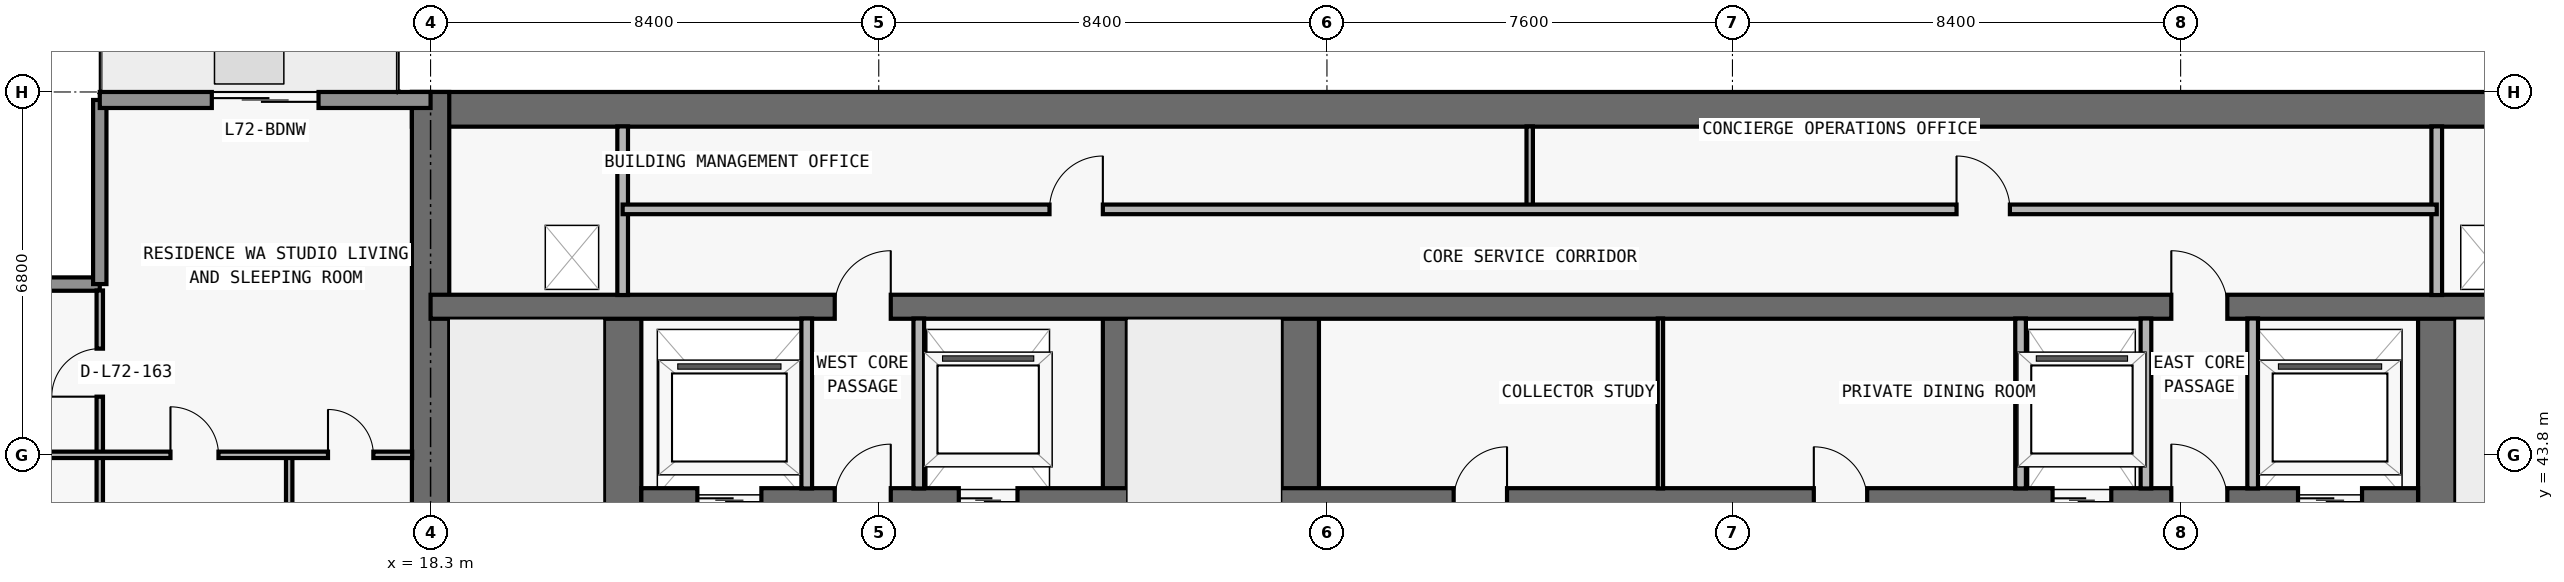
"""IFC4 building model, lengths in metres.
Left out: names, types, materials, properties, quantities, classifications, styles, units other than length and angle.
Written with IfcOpenShell. Run it as: python <this file> out.ifc"""

import sys

from ifc_helpers import new_model, si_unit, direction, frame, frame_2d, origin, place, context, subcontext, project, spatial, rectangle, extrude, element, fill, save


model = new_model("IFC4")
c1 = context("Model", 3, precision=1e-05, world=origin(), true_north=direction((0.0, 1.0)))
c2 = subcontext(c1, "Body", "Model", "MODEL_VIEW")
j1 = project(units=[si_unit("LENGTHUNIT", "METRE"), si_unit("PLANEANGLEUNIT", "RADIAN")], contexts=[c1])
p1 = place(None, origin())
s1 = spatial("IfcSite", under=j1, at=p1, CompositionType="ELEMENT")
p2 = place(p1, origin())
s2 = spatial("IfcBuilding", under=s1, at=p2, CompositionType="ELEMENT")
p3 = place(p2, frame((0.0, 0.0, 256.2)))
s3 = spatial("IfcBuildingStorey", under=s2, at=p3, CompositionType="ELEMENT", Elevation=256.2)
p4 = place(p3, frame((17.95, 50.275, 0.0), z_axis=(0.0, 0.0, 1.0), x_axis=(1.0, 0.0, 0.0)))
e1 = element("IfcWall", 1, at=p4, inside=s3, PredefinedType="SHEAR", context=c2, shape_type="SweptSolid", body=[
    extrude(rectangle(XDim=41.9, YDim=0.65, at=frame_2d((20.95, 0.0))), origin(), (0.0, 0.0, 1.0), 3.05),
])
p5 = place(p3, frame((18.3, 36.65, 0.0), z_axis=(0.0, 0.0, 1.0), x_axis=(0.0, 1.0, 0.0)))
e2 = element("IfcWall", 2, at=p5, inside=s3, PredefinedType="SHEAR", context=c2, shape_type="SweptSolid", body=[
    extrude(rectangle(XDim=13.95, YDim=0.7, at=frame_2d((6.975, 0.0))), origin(), (0.0, 0.0, 1.0), 3.05),
])
p6 = place(p3, frame((21.9, 37.0, 0.0), z_axis=(0.0, 0.0, 1.0), x_axis=(0.0, 1.0, 0.0)))
e3 = element("IfcWall", 3, at=p6, inside=s3, PredefinedType="SHEAR", context=c2, shape_type="SweptSolid", body=[
    extrude(rectangle(XDim=9.575, YDim=0.7, at=frame_2d((4.788, 0.0))), origin(), (0.0, 0.0, 1.0), 3.05),
])
p7 = place(p6, frame((0.55, 0.0, 0.0)))
e4 = element("IfcOpeningElement", 4, at=p7, cuts=e3, PredefinedType="OPENING", context=c2, shape_type="SweptSolid", body=[
    extrude(rectangle(XDim=1.1, YDim=2.15, at=frame_2d((0.55, 1.075))), frame((0.0, 0.36, 0.0), z_axis=(0.0, -1.0, 0.0), x_axis=(1.0, 0.0, 0.0)), (0.0, 0.0, 1.0), 0.72),
])
p8 = place(p3, frame((55.9, 37.0, 0.0), z_axis=(0.0, 0.0, 1.0), x_axis=(0.0, 1.0, 0.0)))
e5 = element("IfcWall", 5, at=p8, inside=s3, PredefinedType="SHEAR", context=c2, shape_type="SweptSolid", body=[
    extrude(rectangle(XDim=9.575, YDim=0.7, at=frame_2d((4.788, 0.0))), origin(), (0.0, 0.0, 1.0), 3.05),
])
p9 = place(p8, frame((0.55, 0.0, 0.0)))
e6 = element("IfcOpeningElement", 6, at=p9, cuts=e5, PredefinedType="OPENING", context=c2, shape_type="SweptSolid", body=[
    extrude(rectangle(XDim=1.1, YDim=2.15, at=frame_2d((0.55, 1.075))), frame((0.0, 0.36, 0.0), z_axis=(0.0, -1.0, 0.0), x_axis=(1.0, 0.0, 0.0)), (0.0, 0.0, 1.0), 0.72),
])
p10 = place(p3, frame((31.125, 37.0, 0.0), z_axis=(0.0, 0.0, 1.0), x_axis=(0.0, 1.0, 0.0)))
e7 = element("IfcWall", 7, at=p10, inside=s3, PredefinedType="SHEAR", context=c2, shape_type="SweptSolid", body=[
    extrude(rectangle(XDim=9.575, YDim=0.45, at=frame_2d((4.788, 0.0))), origin(), (0.0, 0.0, 1.0), 3.05),
])
p11 = place(p3, frame((34.6, 37.0, 0.0), z_axis=(0.0, 0.0, 1.0), x_axis=(0.0, 1.0, 0.0)))
e8 = element("IfcWall", 8, at=p11, inside=s3, PredefinedType="SHEAR", context=c2, shape_type="SweptSolid", body=[
    extrude(rectangle(XDim=9.575, YDim=0.7, at=frame_2d((4.788, 0.0))), origin(), (0.0, 0.0, 1.0), 3.05),
])
p12 = place(p3, frame((22.25, 42.95, 0.0), z_axis=(0.0, 0.0, 1.0), x_axis=(1.0, 0.0, 0.0)))
e9 = element("IfcWall", 9, at=p12, inside=s3, PredefinedType="SHEAR", context=c2, shape_type="SweptSolid", body=[
    extrude(rectangle(XDim=33.3, YDim=0.45, at=frame_2d((16.65, 0.0))), origin(), (0.0, 0.0, 1.0), 3.05),
])
p13 = place(p12, frame((1.05, 0.0, 0.0)))
e10 = element("IfcOpeningElement", 10, at=p13, cuts=e9, PredefinedType="OPENING", context=c2, shape_type="SweptSolid", body=[
    extrude(rectangle(XDim=1.2, YDim=2.2, at=frame_2d((0.6, 1.1))), frame((0.0, 0.235, 0.0), z_axis=(0.0, -1.0, 0.0), x_axis=(1.0, 0.0, 0.0)), (0.0, 0.0, 1.0), 0.47),
])
p14 = place(p12, frame((31.05, 0.0, 0.0)))
e11 = element("IfcOpeningElement", 11, at=p14, cuts=e9, PredefinedType="OPENING", context=c2, shape_type="SweptSolid", body=[
    extrude(rectangle(XDim=1.2, YDim=2.2, at=frame_2d((0.6, 1.1))), frame((0.0, 0.235, 0.0), z_axis=(0.0, -1.0, 0.0), x_axis=(1.0, 0.0, 0.0)), (0.0, 0.0, 1.0), 0.47),
])
p15 = place(p12, frame((26.45, 0.0, 0.0)))
e12 = element("IfcOpeningElement", 12, at=p15, cuts=e9, PredefinedType="OPENING", context=c2, shape_type="SweptSolid", body=[
    extrude(rectangle(XDim=1.1, YDim=2.2, at=frame_2d((0.55, 1.1))), frame((0.0, 0.235, 0.0), z_axis=(0.0, -1.0, 0.0), x_axis=(1.0, 0.0, 0.0)), (0.0, 0.0, 1.0), 0.47),
])
p16 = place(p12, frame((5.95, 0.0, 0.0)))
e13 = element("IfcOpeningElement", 13, at=p16, cuts=e9, PredefinedType="OPENING", context=c2, shape_type="SweptSolid", body=[
    extrude(rectangle(XDim=1.1, YDim=2.2, at=frame_2d((0.55, 1.1))), frame((0.0, 0.235, 0.0), z_axis=(0.0, -1.0, 0.0), x_axis=(1.0, 0.0, 0.0)), (0.0, 0.0, 1.0), 0.47),
])
p17 = place(p12, frame((3.625, 0.0, 0.0)))
e14 = element("IfcOpeningElement", 14, at=p17, cuts=e9, PredefinedType="OPENING", context=c2, shape_type="SweptSolid", body=[
    extrude(rectangle(XDim=1.05, YDim=2.15, at=frame_2d((0.525, 1.075))), frame((0.0, 0.235, 0.0), z_axis=(0.0, -1.0, 0.0), x_axis=(1.0, 0.0, 0.0)), (0.0, 0.0, 1.0), 0.47),
])
p18 = place(p12, frame((28.675, 0.0, 0.0)))
e15 = element("IfcOpeningElement", 15, at=p18, cuts=e9, PredefinedType="OPENING", context=c2, shape_type="SweptSolid", body=[
    extrude(rectangle(XDim=1.05, YDim=2.15, at=frame_2d((0.525, 1.075))), frame((0.0, 0.235, 0.0), z_axis=(0.0, -1.0, 0.0), x_axis=(1.0, 0.0, 0.0)), (0.0, 0.0, 1.0), 0.47),
])
p19 = place(p12, frame((15.225, 0.0, 0.0)))
e16 = element("IfcOpeningElement", 16, at=p19, cuts=e9, PredefinedType="OPENING", context=c2, shape_type="SweptSolid", body=[
    extrude(rectangle(XDim=1.0, YDim=2.2, at=frame_2d((0.5, 1.1))), frame((0.0, 0.235, 0.0), z_axis=(0.0, -1.0, 0.0), x_axis=(1.0, 0.0, 0.0)), (0.0, 0.0, 1.0), 0.47),
])
p20 = place(p12, frame((21.975, 0.0, 0.0)))
e17 = element("IfcOpeningElement", 17, at=p20, cuts=e9, PredefinedType="OPENING", context=c2, shape_type="SweptSolid", body=[
    extrude(rectangle(XDim=1.0, YDim=2.2, at=frame_2d((0.5, 1.1))), frame((0.0, 0.235, 0.0), z_axis=(0.0, -1.0, 0.0), x_axis=(1.0, 0.0, 0.0)), (0.0, 0.0, 1.0), 0.47),
])
p21 = place(p3, frame((18.3, 46.575, 0.0), z_axis=(0.0, 0.0, 1.0), x_axis=(1.0, 0.0, 0.0)))
e18 = element("IfcWall", 18, at=p21, inside=s3, PredefinedType="SHEAR", context=c2, shape_type="SweptSolid", body=[
    extrude(rectangle(XDim=41.2, YDim=0.45, at=frame_2d((20.6, 0.0))), origin(), (0.0, 0.0, 1.0), 3.05),
])
p22 = place(p21, frame((7.575, 0.0, 0.0)))
e19 = element("IfcOpeningElement", 19, at=p22, cuts=e18, PredefinedType="OPENING", context=c2, shape_type="SweptSolid", body=[
    extrude(rectangle(XDim=1.05, YDim=2.15, at=frame_2d((0.525, 1.075))), frame((0.0, 0.235, 0.0), z_axis=(0.0, -1.0, 0.0), x_axis=(1.0, 0.0, 0.0)), (0.0, 0.0, 1.0), 0.47),
])
p23 = place(p21, frame((32.625, 0.0, 0.0)))
e20 = element("IfcOpeningElement", 20, at=p23, cuts=e18, PredefinedType="OPENING", context=c2, shape_type="SweptSolid", body=[
    extrude(rectangle(XDim=1.05, YDim=2.15, at=frame_2d((0.525, 1.075))), frame((0.0, 0.235, 0.0), z_axis=(0.0, -1.0, 0.0), x_axis=(1.0, 0.0, 0.0)), (0.0, 0.0, 1.0), 0.47),
])
p24 = place(p3, frame((8.25, 47.0, 0.0), z_axis=(0.0, 0.0, 1.0), x_axis=(1.0, 0.0, 0.0)))
e21 = element("IfcWall", 21, at=p24, inside=s3, PredefinedType="ELEMENTEDWALL", context=c2, shape_type="SweptSolid", body=[
    extrude(rectangle(XDim=3.85, YDim=0.25, at=frame_2d((1.925, 0.0))), origin(), (0.0, 0.0, 1.0), 3.05),
])
p25 = place(p3, frame((12.1, 47.0, 0.0), z_axis=(0.0, 0.0, 1.0), x_axis=(0.0, 1.0, 0.0)))
e22 = element("IfcWall", 22, at=p25, inside=s3, PredefinedType="ELEMENTEDWALL", context=c2, shape_type="SweptSolid", body=[
    extrude(rectangle(XDim=3.45, YDim=0.25, at=frame_2d((1.725, 0.0))), origin(), (0.0, 0.0, 1.0), 3.05),
])
p26 = place(p3, frame((12.1, 50.45, 0.0), z_axis=(0.0, 0.0, 1.0), x_axis=(1.0, 0.0, 0.0)))
e23 = element("IfcWall", 23, at=p26, inside=s3, PredefinedType="STANDARD", context=c2, shape_type="SweptSolid", body=[
    extrude(rectangle(XDim=6.2, YDim=0.3, at=frame_2d((3.1, 0.0))), origin(), (0.0, 0.0, 1.0), 3.05),
])
p27 = place(p26, frame((2.1, 0.0, 0.0)))
e24 = element("IfcOpeningElement", 24, at=p27, cuts=e23, PredefinedType="OPENING", context=c2, shape_type="SweptSolid", body=[
    extrude(rectangle(XDim=2.0, YDim=2.3, at=frame_2d((1.0, 1.15))), frame((0.0, 0.16, 0.0), z_axis=(0.0, -1.0, 0.0), x_axis=(1.0, 0.0, 0.0)), (0.0, 0.0, 1.0), 0.32),
])
p28 = place(p3, frame((12.1, 37.005, 0.0), z_axis=(0.0, 0.0, 1.0), x_axis=(0.0, 1.0, 0.0)))
e25 = element("IfcWall", 25, at=p28, inside=s3, PredefinedType="PARTITIONING", context=c2, shape_type="SweptSolid", body=[
    extrude(rectangle(XDim=9.875, YDim=0.12, at=frame_2d((4.938, 0.0))), origin(), (0.0, 0.0, 1.0), 3.05),
])
p29 = place(p28, frame((2.948, 0.0, 0.0)))
e26 = element("IfcOpeningElement", 26, at=p29, cuts=e25, PredefinedType="OPENING", context=c2, shape_type="SweptSolid", body=[
    extrude(rectangle(XDim=0.9, YDim=2.15, at=frame_2d((0.45, 1.075))), frame((0.0, 0.07, 0.0), z_axis=(0.0, -1.0, 0.0), x_axis=(1.0, 0.0, 0.0)), (0.0, 0.0, 1.0), 0.14),
])
p30 = place(p28, frame((7.885, 0.0, 0.0)))
e27 = element("IfcOpeningElement", 27, at=p30, cuts=e25, PredefinedType="OPENING", context=c2, shape_type="SweptSolid", body=[
    extrude(rectangle(XDim=0.9, YDim=2.15, at=frame_2d((0.45, 1.075))), frame((0.0, 0.07, 0.0), z_axis=(0.0, -1.0, 0.0), x_axis=(1.0, 0.0, 0.0)), (0.0, 0.0, 1.0), 0.14),
])
p31 = place(p3, frame((15.65, 37.0, 0.0), z_axis=(0.0, 0.0, 1.0), x_axis=(0.0, 1.0, 0.0)))
e28 = element("IfcWall", 28, at=p31, inside=s3, PredefinedType="PARTITIONING", context=c2, shape_type="SweptSolid", body=[
    extrude(rectangle(XDim=6.8, YDim=0.12, at=frame_2d((3.4, 0.0))), origin(), (0.0, 0.0, 1.0), 2.725),
])
p32 = place(p31, frame((1.207, 0.0, 0.0)))
e29 = element("IfcOpeningElement", 29, at=p32, cuts=e28, PredefinedType="OPENING", context=c2, shape_type="SweptSolid", body=[
    extrude(rectangle(XDim=0.85, YDim=2.1, at=frame_2d((0.425, 1.05))), frame((0.0, 0.07, 0.0), z_axis=(0.0, -1.0, 0.0), x_axis=(1.0, 0.0, 0.0)), (0.0, 0.0, 1.0), 0.14),
])
p33 = place(p3, frame((21.9, 46.795, 0.0), z_axis=(0.0, 0.0, 1.0), x_axis=(0.0, 1.0, 0.0)))
e30 = element("IfcWall", 30, at=p33, inside=s3, PredefinedType="PARTITIONING", context=c2, shape_type="SweptSolid", body=[
    extrude(rectangle(XDim=3.16, YDim=0.2, at=frame_2d((1.58, 0.0))), origin(), (0.0, 0.0, 1.0), 3.05),
])
for number, where, z_axis, x_axis in (
    (31, (25.35, 43.17, 0.0), (0.0, 0.0, 1.0), (0.0, 1.0, 0.0)),
    (32, (27.45, 43.17, 0.0), (0.0, 0.0, 1.0), (0.0, 1.0, 0.0)),
):
    element("IfcWall", number, at=place(p3, frame(where, z_axis=z_axis, x_axis=x_axis)), inside=s3, PredefinedType="PARTITIONING", context=c2, shape_type="SweptSolid", body=[
        extrude(rectangle(XDim=3.185, YDim=0.2, at=frame_2d((1.593, 0.0))), origin(), (0.0, 0.0, 1.0), 3.05),
    ])
p34 = place(p3, frame((38.9, 48.4, 0.0), z_axis=(0.0, 0.0, 1.0), x_axis=(0.0, 1.0, 0.0)))
e33 = element("IfcWall", 33, at=p34, inside=s3, PredefinedType="PARTITIONING", context=c2, shape_type="SweptSolid", body=[
    extrude(rectangle(XDim=1.555, YDim=0.12, at=frame_2d((0.778, 0.0))), origin(), (0.0, 0.0, 1.0), 3.05),
])
p35 = place(p3, frame((41.35, 43.17, 0.0), z_axis=(0.0, 0.0, 1.0), x_axis=(0.0, 1.0, 0.0)))
e34 = element("IfcWall", 34, at=p35, inside=s3, PredefinedType="MOVABLE", context=c2, shape_type="SweptSolid", body=[
    extrude(rectangle(XDim=3.185, YDim=0.1, at=frame_2d((1.593, 0.0))), origin(), (0.0, 0.0, 1.0), 3.05),
])
for number, where, z_axis, x_axis in (
    (35, (48.1, 43.17, 0.0), (0.0, 0.0, 1.0), (0.0, 1.0, 0.0)),
    (36, (50.45, 43.17, 0.0), (0.0, 0.0, 1.0), (0.0, 1.0, 0.0)),
    (37, (52.45, 43.17, 0.0), (0.0, 0.0, 1.0), (0.0, 1.0, 0.0)),
):
    element("IfcWall", number, at=place(p3, frame(where, z_axis=z_axis, x_axis=x_axis)), inside=s3, PredefinedType="PARTITIONING", context=c2, shape_type="SweptSolid", body=[
        extrude(rectangle(XDim=3.185, YDim=0.2, at=frame_2d((1.593, 0.0))), origin(), (0.0, 0.0, 1.0), 3.05),
    ])
p36 = place(p3, frame((55.9, 46.795, 0.0), z_axis=(0.0, 0.0, 1.0), x_axis=(0.0, 1.0, 0.0)))
e38 = element("IfcWall", 38, at=p36, inside=s3, PredefinedType="PARTITIONING", context=c2, shape_type="SweptSolid", body=[
    extrude(rectangle(XDim=3.16, YDim=0.2, at=frame_2d((1.58, 0.0))), origin(), (0.0, 0.0, 1.0), 3.05),
])
p37 = place(p3, frame((8.395, 43.8, 0.0), z_axis=(0.0, 0.0, 1.0), x_axis=(1.0, 0.0, 0.0)))
e39 = element("IfcWall", 39, at=p37, inside=s3, PredefinedType="PARTITIONING", context=c2, shape_type="SweptSolid", body=[
    extrude(rectangle(XDim=9.56, YDim=0.12, at=frame_2d((4.78, 0.0))), origin(), (0.0, 0.0, 1.0), 2.418),
])
p38 = place(p37, frame((5.03, 0.0, 0.0)))
e40 = element("IfcOpeningElement", 40, at=p38, cuts=e39, PredefinedType="OPENING", context=c2, shape_type="SweptSolid", body=[
    extrude(rectangle(XDim=0.9, YDim=2.15, at=frame_2d((0.45, 1.075))), frame((0.0, 0.07, 0.0), z_axis=(0.0, -1.0, 0.0), x_axis=(1.0, 0.0, 0.0)), (0.0, 0.0, 1.0), 0.14),
])
p39 = place(p37, frame((7.982, 0.0, 0.0)))
e41 = element("IfcOpeningElement", 41, at=p39, cuts=e39, PredefinedType="OPENING", context=c2, shape_type="SweptSolid", body=[
    extrude(rectangle(XDim=0.85, YDim=2.1, at=frame_2d((0.425, 1.05))), frame((0.0, 0.07, 0.0), z_axis=(0.0, -1.0, 0.0), x_axis=(1.0, 0.0, 0.0)), (0.0, 0.0, 1.0), 0.14),
])
p40 = place(p3, frame((21.9, 48.4, 0.0), z_axis=(0.0, 0.0, 1.0), x_axis=(1.0, 0.0, 0.0)))
e42 = element("IfcWall", 42, at=p40, inside=s3, PredefinedType="PARTITIONING", context=c2, shape_type="SweptSolid", body=[
    extrude(rectangle(XDim=34.0, YDim=0.18, at=frame_2d((17.0, 0.0))), origin(), (0.0, 0.0, 1.0), 3.05),
])
p41 = place(p40, frame((8.0, 0.0, 0.0)))
e43 = element("IfcOpeningElement", 43, at=p41, cuts=e42, PredefinedType="OPENING", context=c2, shape_type="SweptSolid", body=[
    extrude(rectangle(XDim=1.0, YDim=2.2, at=frame_2d((0.5, 1.1))), frame((0.0, 0.1, 0.0), z_axis=(0.0, -1.0, 0.0), x_axis=(1.0, 0.0, 0.0)), (0.0, 0.0, 1.0), 0.2),
])
p42 = place(p40, frame((25.0, 0.0, 0.0)))
e44 = element("IfcOpeningElement", 44, at=p42, cuts=e42, PredefinedType="OPENING", context=c2, shape_type="SweptSolid", body=[
    extrude(rectangle(XDim=1.0, YDim=2.2, at=frame_2d((0.5, 1.1))), frame((0.0, 0.1, 0.0), z_axis=(0.0, -1.0, 0.0), x_axis=(1.0, 0.0, 0.0)), (0.0, 0.0, 1.0), 0.2),
])
p43 = place(p27, origin())
e45 = element("IfcDoor", 45, at=p43, inside=s3, OperationType="DOUBLE_DOOR_SLIDING", PredefinedType="DOOR", context=c2, shape_type="SweptSolid", body=[
    extrude(rectangle(XDim=2.0, YDim=2.3, at=frame_2d((1.0, 1.15))), frame((0.0, 0.025, 0.0), z_axis=(0.0, -1.0, 0.0), x_axis=(1.0, 0.0, 0.0)), (0.0, 0.0, 1.0), 0.05),
])
fill(e24, e45)
p44 = place(p13, origin())
e46 = element("IfcDoor", 46, at=p44, inside=s3, OperationType="DOUBLE_DOOR_SLIDING", PredefinedType="DOOR", context=c2, shape_type="SweptSolid", body=[
    extrude(rectangle(XDim=1.2, YDim=2.2, at=frame_2d((0.6, 1.1))), frame((0.0, 0.025, 0.0), z_axis=(0.0, -1.0, 0.0), x_axis=(1.0, 0.0, 0.0)), (0.0, 0.0, 1.0), 0.05),
])
fill(e10, e46)
p45 = place(p14, origin())
e47 = element("IfcDoor", 47, at=p45, inside=s3, OperationType="DOUBLE_DOOR_SLIDING", PredefinedType="DOOR", context=c2, shape_type="SweptSolid", body=[
    extrude(rectangle(XDim=1.2, YDim=2.2, at=frame_2d((0.6, 1.1))), frame((0.0, 0.025, 0.0), z_axis=(0.0, -1.0, 0.0), x_axis=(1.0, 0.0, 0.0)), (0.0, 0.0, 1.0), 0.05),
])
fill(e11, e47)
p46 = place(p15, origin())
e48 = element("IfcDoor", 48, at=p46, inside=s3, OperationType="DOUBLE_DOOR_SLIDING", PredefinedType="DOOR", context=c2, shape_type="SweptSolid", body=[
    extrude(rectangle(XDim=1.1, YDim=2.2, at=frame_2d((0.55, 1.1))), frame((0.0, 0.025, 0.0), z_axis=(0.0, -1.0, 0.0), x_axis=(1.0, 0.0, 0.0)), (0.0, 0.0, 1.0), 0.05),
])
fill(e12, e48)
p47 = place(p16, origin())
e49 = element("IfcDoor", 49, at=p47, inside=s3, OperationType="DOUBLE_DOOR_SLIDING", PredefinedType="DOOR", context=c2, shape_type="SweptSolid", body=[
    extrude(rectangle(XDim=1.1, YDim=2.2, at=frame_2d((0.55, 1.1))), frame((0.0, 0.025, 0.0), z_axis=(0.0, -1.0, 0.0), x_axis=(1.0, 0.0, 0.0)), (0.0, 0.0, 1.0), 0.05),
])
fill(e13, e49)
p48 = place(p17, origin())
e50 = element("IfcDoor", 50, at=p48, inside=s3, OperationType="SINGLE_SWING_RIGHT", PredefinedType="DOOR", context=c2, shape_type="SweptSolid", body=[
    extrude(rectangle(XDim=1.05, YDim=2.15, at=frame_2d((0.525, 1.075))), frame((0.0, 0.025, 0.0), z_axis=(0.0, -1.0, 0.0), x_axis=(1.0, 0.0, 0.0)), (0.0, 0.0, 1.0), 0.05),
])
fill(e14, e50)
p49 = place(p18, origin())
e51 = element("IfcDoor", 51, at=p49, inside=s3, OperationType="SINGLE_SWING_LEFT", PredefinedType="DOOR", context=c2, shape_type="SweptSolid", body=[
    extrude(rectangle(XDim=1.05, YDim=2.15, at=frame_2d((0.525, 1.075))), frame((0.0, 0.025, 0.0), z_axis=(0.0, -1.0, 0.0), x_axis=(1.0, 0.0, 0.0)), (0.0, 0.0, 1.0), 0.05),
])
fill(e15, e51)
p50 = place(p19, origin())
e52 = element("IfcDoor", 52, at=p50, inside=s3, OperationType="SINGLE_SWING_RIGHT", PredefinedType="DOOR", context=c2, shape_type="SweptSolid", body=[
    extrude(rectangle(XDim=1.0, YDim=2.2, at=frame_2d((0.5, 1.1))), frame((0.0, 0.025, 0.0), z_axis=(0.0, -1.0, 0.0), x_axis=(1.0, 0.0, 0.0)), (0.0, 0.0, 1.0), 0.05),
])
fill(e16, e52)
p51 = place(p20, origin())
e53 = element("IfcDoor", 53, at=p51, inside=s3, OperationType="SINGLE_SWING_LEFT", PredefinedType="DOOR", context=c2, shape_type="SweptSolid", body=[
    extrude(rectangle(XDim=1.0, YDim=2.2, at=frame_2d((0.5, 1.1))), frame((0.0, 0.025, 0.0), z_axis=(0.0, -1.0, 0.0), x_axis=(1.0, 0.0, 0.0)), (0.0, 0.0, 1.0), 0.05),
])
fill(e17, e53)
p52 = place(p22, origin())
e54 = element("IfcDoor", 54, at=p52, inside=s3, OperationType="SINGLE_SWING_RIGHT", PredefinedType="DOOR", context=c2, shape_type="SweptSolid", body=[
    extrude(rectangle(XDim=1.05, YDim=2.15, at=frame_2d((0.525, 1.075))), frame((0.0, 0.025, 0.0), z_axis=(0.0, -1.0, 0.0), x_axis=(1.0, 0.0, 0.0)), (0.0, 0.0, 1.0), 0.05),
])
fill(e19, e54)
p53 = place(p23, origin())
e55 = element("IfcDoor", 55, at=p53, inside=s3, OperationType="SINGLE_SWING_LEFT", PredefinedType="DOOR", context=c2, shape_type="SweptSolid", body=[
    extrude(rectangle(XDim=1.05, YDim=2.15, at=frame_2d((0.525, 1.075))), frame((0.0, 0.025, 0.0), z_axis=(0.0, -1.0, 0.0), x_axis=(1.0, 0.0, 0.0)), (0.0, 0.0, 1.0), 0.05),
])
fill(e20, e55)
p54 = place(p41, origin())
e56 = element("IfcDoor", 56, at=p54, inside=s3, OperationType="SINGLE_SWING_RIGHT", PredefinedType="DOOR", context=c2, shape_type="SweptSolid", body=[
    extrude(rectangle(XDim=1.0, YDim=2.2, at=frame_2d((0.5, 1.1))), frame((0.0, 0.025, 0.0), z_axis=(0.0, -1.0, 0.0), x_axis=(1.0, 0.0, 0.0)), (0.0, 0.0, 1.0), 0.05),
])
fill(e43, e56)
p55 = place(p42, origin())
e57 = element("IfcDoor", 57, at=p55, inside=s3, OperationType="SINGLE_SWING_LEFT", PredefinedType="DOOR", context=c2, shape_type="SweptSolid", body=[
    extrude(rectangle(XDim=1.0, YDim=2.2, at=frame_2d((0.5, 1.1))), frame((0.0, 0.025, 0.0), z_axis=(0.0, -1.0, 0.0), x_axis=(1.0, 0.0, 0.0)), (0.0, 0.0, 1.0), 0.05),
])
fill(e44, e57)
p56 = place(p38, origin())
e58 = element("IfcDoor", 58, at=p56, inside=s3, OperationType="SINGLE_SWING_LEFT", PredefinedType="DOOR", context=c2, shape_type="SweptSolid", body=[
    extrude(rectangle(XDim=0.9, YDim=2.15, at=frame_2d((0.45, 1.075))), frame((0.0, 0.025, 0.0), z_axis=(0.0, -1.0, 0.0), x_axis=(1.0, 0.0, 0.0)), (0.0, 0.0, 1.0), 0.05),
])
fill(e40, e58)
p57 = place(p39, origin())
e59 = element("IfcDoor", 59, at=p57, inside=s3, OperationType="SINGLE_SWING_LEFT", PredefinedType="DOOR", context=c2, shape_type="SweptSolid", body=[
    extrude(rectangle(XDim=0.85, YDim=2.1, at=frame_2d((0.425, 1.05))), frame((0.0, 0.025, 0.0), z_axis=(0.0, -1.0, 0.0), x_axis=(1.0, 0.0, 0.0)), (0.0, 0.0, 1.0), 0.05),
])
fill(e41, e59)
p58 = place(p30, origin())
e60 = element("IfcDoor", 60, at=p58, inside=s3, OperationType="SINGLE_SWING_LEFT", PredefinedType="DOOR", context=c2, shape_type="SweptSolid", body=[
    extrude(rectangle(XDim=0.9, YDim=2.15, at=frame_2d((0.45, 1.075))), frame((0.0, 0.025, 0.0), z_axis=(0.0, -1.0, 0.0), x_axis=(1.0, 0.0, 0.0)), (0.0, 0.0, 1.0), 0.05),
])
fill(e27, e60)
save(model, sys.argv[1])
